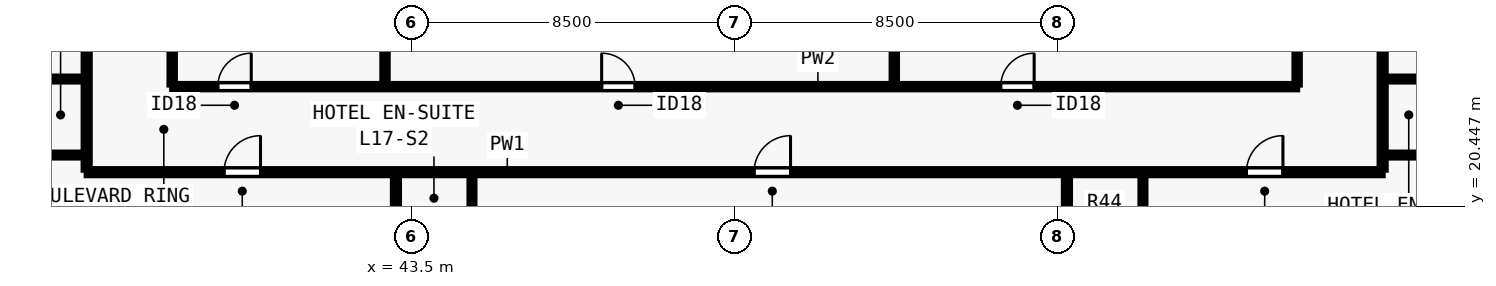
"""IFC4 building model, lengths in metres.
Left out: names, types, materials, properties, quantities, classifications, styles, units other than length and angle.
Written with IfcOpenShell. Run it as: python <this file> out.ifc"""

import sys

from ifc_helpers import new_model, si_unit, direction, frame, frame_2d, origin, place, context, subcontext, project, spatial, rectangle, extrude, element, fill, save


model = new_model("IFC4")
c1 = context("Model", 3, precision=1e-05, world=origin(), true_north=direction((0.0, 1.0)))
c2 = subcontext(c1, "Body", "Model", "MODEL_VIEW")
j1 = project(units=[si_unit("LENGTHUNIT", "METRE"), si_unit("PLANEANGLEUNIT", "RADIAN")], contexts=[c1])
p1 = place(None, origin())
s1 = spatial("IfcSite", under=j1, at=p1, CompositionType="ELEMENT")
p2 = place(p1, origin())
s2 = spatial("IfcBuilding", under=s1, at=p2, CompositionType="ELEMENT")
p3 = place(p2, frame((0.0, 0.0, 65.5)))
s3 = spatial("IfcBuildingStorey", under=s2, at=p3, CompositionType="ELEMENT", Elevation=65.5)
p4 = place(p3, frame((34.95, 21.35, 0.0), z_axis=(0.0, 0.0, 1.0), x_axis=(1.0, 0.0, 0.0)))
e1 = element("IfcWall", 1, at=p4, inside=s3, PredefinedType="PARTITIONING", context=c2, shape_type="SweptSolid", body=[
    extrude(rectangle(XDim=34.1, YDim=0.16, at=frame_2d((17.05, 0.0))), origin(), (0.0, 0.0, 1.0), 3.28),
])
p5 = place(p4, frame((3.614, 0.0, 0.0)))
e2 = element("IfcOpeningElement", 2, at=p5, cuts=e1, PredefinedType="OPENING", context=c2, shape_type="SweptSolid", body=[
    extrude(rectangle(XDim=0.96, YDim=2.15, at=frame_2d((0.48, 1.075))), frame((0.0, 0.09, 0.0), z_axis=(0.0, -1.0, 0.0), x_axis=(1.0, 0.0, 0.0)), (0.0, 0.0, 1.0), 0.18),
])
p6 = place(p4, frame((17.56, 0.0, 0.0)))
e3 = element("IfcOpeningElement", 3, at=p6, cuts=e1, PredefinedType="OPENING", context=c2, shape_type="SweptSolid", body=[
    extrude(rectangle(XDim=0.96, YDim=2.15, at=frame_2d((0.48, 1.075))), frame((0.0, 0.09, 0.0), z_axis=(0.0, -1.0, 0.0), x_axis=(1.0, 0.0, 0.0)), (0.0, 0.0, 1.0), 0.18),
])
p7 = place(p4, frame((30.516, 0.0, 0.0)))
e4 = element("IfcOpeningElement", 4, at=p7, cuts=e1, PredefinedType="OPENING", context=c2, shape_type="SweptSolid", body=[
    extrude(rectangle(XDim=0.96, YDim=2.15, at=frame_2d((0.48, 1.075))), frame((0.0, 0.09, 0.0), z_axis=(0.0, -1.0, 0.0), x_axis=(1.0, 0.0, 0.0)), (0.0, 0.0, 1.0), 0.18),
])
p8 = place(p3, frame((34.95, 21.415, 0.0), z_axis=(0.0, 0.0, 1.0), x_axis=(0.0, 1.0, 0.0)))
e5 = element("IfcWall", 5, at=p8, inside=s3, PredefinedType="PARTITIONING", context=c2, shape_type="SweptSolid", body=[
    extrude(rectangle(XDim=35.17, YDim=0.16, at=frame_2d((17.585, 0.0))), origin(), (0.0, 0.0, 1.0), 3.28),
])
p9 = place(p8, frame((9.414, 0.0, 0.0)))
e6 = element("IfcOpeningElement", 6, at=p9, cuts=e5, PredefinedType="OPENING", context=c2, shape_type="SweptSolid", body=[
    extrude(rectangle(XDim=0.96, YDim=2.15, at=frame_2d((0.48, 1.075))), frame((0.0, 0.09, 0.0), z_axis=(0.0, -1.0, 0.0), x_axis=(1.0, 0.0, 0.0)), (0.0, 0.0, 1.0), 0.18),
])
p10 = place(p8, frame((26.814, 0.0, 0.0)))
e7 = element("IfcOpeningElement", 7, at=p10, cuts=e5, PredefinedType="OPENING", context=c2, shape_type="SweptSolid", body=[
    extrude(rectangle(XDim=0.96, YDim=2.15, at=frame_2d((0.48, 1.075))), frame((0.0, 0.09, 0.0), z_axis=(0.0, -1.0, 0.0), x_axis=(1.0, 0.0, 0.0)), (0.0, 0.0, 1.0), 0.18),
])
p11 = place(p3, frame((69.05, 21.415, 0.0), z_axis=(0.0, 0.0, 1.0), x_axis=(0.0, 1.0, 0.0)))
e8 = element("IfcWall", 8, at=p11, inside=s3, PredefinedType="PARTITIONING", context=c2, shape_type="SweptSolid", body=[
    extrude(rectangle(XDim=35.17, YDim=0.16, at=frame_2d((17.585, 0.0))), origin(), (0.0, 0.0, 1.0), 3.28),
])
p12 = place(p11, frame((9.746, 0.0, 0.0)))
e9 = element("IfcOpeningElement", 9, at=p12, cuts=e8, PredefinedType="OPENING", context=c2, shape_type="SweptSolid", body=[
    extrude(rectangle(XDim=0.96, YDim=2.15, at=frame_2d((0.48, 1.075))), frame((0.0, 0.09, 0.0), z_axis=(0.0, -1.0, 0.0), x_axis=(1.0, 0.0, 0.0)), (0.0, 0.0, 1.0), 0.18),
])
p13 = place(p11, frame((27.146, 0.0, 0.0)))
e10 = element("IfcOpeningElement", 10, at=p13, cuts=e8, PredefinedType="OPENING", context=c2, shape_type="SweptSolid", body=[
    extrude(rectangle(XDim=0.96, YDim=2.15, at=frame_2d((0.48, 1.075))), frame((0.0, 0.09, 0.0), z_axis=(0.0, -1.0, 0.0), x_axis=(1.0, 0.0, 0.0)), (0.0, 0.0, 1.0), 0.18),
])
p14 = place(p3, frame((37.2, 23.6, 0.0), z_axis=(0.0, 0.0, 1.0), x_axis=(1.0, 0.0, 0.0)))
e11 = element("IfcWall", 11, at=p14, inside=s3, PredefinedType="PARTITIONING", context=c2, shape_type="SweptSolid", body=[
    extrude(rectangle(XDim=29.6, YDim=0.14, at=frame_2d((14.8, 0.0))), origin(), (0.0, 0.0, 1.0), 3.28),
])
p15 = place(p14, frame((1.2, 0.0, 0.0)))
e12 = element("IfcOpeningElement", 12, at=p15, cuts=e11, PredefinedType="OPENING", context=c2, shape_type="SweptSolid", body=[
    extrude(rectangle(XDim=0.88, YDim=2.1, at=frame_2d((0.44, 1.05))), frame((0.0, 0.08, 0.0), z_axis=(0.0, -1.0, 0.0), x_axis=(1.0, 0.0, 0.0)), (0.0, 0.0, 1.0), 0.16),
])
p16 = place(p14, frame((11.3, 0.0, 0.0)))
e13 = element("IfcOpeningElement", 13, at=p16, cuts=e11, PredefinedType="OPENING", context=c2, shape_type="SweptSolid", body=[
    extrude(rectangle(XDim=0.88, YDim=2.1, at=frame_2d((0.44, 1.05))), frame((0.0, 0.08, 0.0), z_axis=(0.0, -1.0, 0.0), x_axis=(1.0, 0.0, 0.0)), (0.0, 0.0, 1.0), 0.16),
])
p17 = place(p14, frame((21.8, 0.0, 0.0)))
e14 = element("IfcOpeningElement", 14, at=p17, cuts=e11, PredefinedType="OPENING", context=c2, shape_type="SweptSolid", body=[
    extrude(rectangle(XDim=0.88, YDim=2.1, at=frame_2d((0.44, 1.05))), frame((0.0, 0.08, 0.0), z_axis=(0.0, -1.0, 0.0), x_axis=(1.0, 0.0, 0.0)), (0.0, 0.0, 1.0), 0.16),
])
p18 = place(p3, frame((37.2, 23.655, 0.0), z_axis=(0.0, 0.0, 1.0), x_axis=(0.0, 1.0, 0.0)))
e15 = element("IfcWall", 15, at=p18, inside=s3, PredefinedType="PARTITIONING", context=c2, shape_type="SweptSolid", body=[
    extrude(rectangle(XDim=15.095, YDim=0.14, at=frame_2d((7.547, 0.0))), origin(), (0.0, 0.0, 1.0), 3.28),
])
p19 = place(p18, frame((1.045, 0.0, 0.0)))
e16 = element("IfcOpeningElement", 16, at=p19, cuts=e15, PredefinedType="OPENING", context=c2, shape_type="SweptSolid", body=[
    extrude(rectangle(XDim=0.88, YDim=2.1, at=frame_2d((0.44, 1.05))), frame((0.0, 0.08, 0.0), z_axis=(0.0, -1.0, 0.0), x_axis=(1.0, 0.0, 0.0)), (0.0, 0.0, 1.0), 0.16),
])
p20 = place(p18, frame((12.145, 0.0, 0.0)))
e17 = element("IfcOpeningElement", 17, at=p20, cuts=e15, PredefinedType="OPENING", context=c2, shape_type="SweptSolid", body=[
    extrude(rectangle(XDim=0.88, YDim=2.1, at=frame_2d((0.44, 1.05))), frame((0.0, 0.08, 0.0), z_axis=(0.0, -1.0, 0.0), x_axis=(1.0, 0.0, 0.0)), (0.0, 0.0, 1.0), 0.16),
])
p21 = place(p3, frame((66.8, 23.655, 0.0), z_axis=(0.0, 0.0, 1.0), x_axis=(0.0, 1.0, 0.0)))
e18 = element("IfcWall", 18, at=p21, inside=s3, PredefinedType="PARTITIONING", context=c2, shape_type="SweptSolid", body=[
    extrude(rectangle(XDim=15.095, YDim=0.14, at=frame_2d((7.547, 0.0))), origin(), (0.0, 0.0, 1.0), 3.28),
])
p22 = place(p21, frame((2.445, 0.0, 0.0)))
e19 = element("IfcOpeningElement", 19, at=p22, cuts=e18, PredefinedType="OPENING", context=c2, shape_type="SweptSolid", body=[
    extrude(rectangle(XDim=0.88, YDim=2.1, at=frame_2d((0.44, 1.05))), frame((0.0, 0.08, 0.0), z_axis=(0.0, -1.0, 0.0), x_axis=(1.0, 0.0, 0.0)), (0.0, 0.0, 1.0), 0.16),
])
p23 = place(p3, frame((42.8, 23.655, 0.0), z_axis=(0.0, 0.0, 1.0), x_axis=(0.0, 1.0, 0.0)))
e20 = element("IfcWall", 20, at=p23, inside=s3, PredefinedType="PARTITIONING", context=c2, shape_type="SweptSolid", body=[
    extrude(rectangle(XDim=6.845, YDim=0.14, at=frame_2d((3.422, 0.0))), origin(), (0.0, 0.0, 1.0), 2.439),
])
p24 = place(p3, frame((56.2, 23.655, 0.0), z_axis=(0.0, 0.0, 1.0), x_axis=(0.0, 1.0, 0.0)))
e21 = element("IfcWall", 21, at=p24, inside=s3, PredefinedType="PARTITIONING", context=c2, shape_type="SweptSolid", body=[
    extrude(rectangle(XDim=6.585, YDim=0.14, at=frame_2d((3.292, 0.0))), origin(), (0.0, 0.0, 1.0), 2.849),
])
p25 = place(p3, frame((43.087, 13.845, 0.0), z_axis=(0.0, 0.0, 1.0), x_axis=(0.0, 1.0, 0.0)))
e22 = element("IfcWall", 22, at=p25, inside=s3, PredefinedType="PARTITIONING", context=c2, shape_type="SweptSolid", body=[
    extrude(rectangle(XDim=7.44, YDim=0.16, at=frame_2d((3.72, 0.0))), origin(), (0.0, 0.0, 1.0), 3.28),
])
p26 = place(p3, frame((45.087, 19.05, 0.0), z_axis=(0.0, 0.0, 1.0), x_axis=(0.0, 1.0, 0.0)))
e23 = element("IfcWall", 23, at=p26, inside=s3, PredefinedType="PLUMBINGWALL", context=c2, shape_type="SweptSolid", body=[
    extrude(rectangle(XDim=2.235, YDim=0.13, at=frame_2d((1.117, 0.0))), origin(), (0.0, 0.0, 1.0), 3.28),
])
p27 = place(p3, frame((60.742, 13.845, 0.0), z_axis=(0.0, 0.0, 1.0), x_axis=(0.0, 1.0, 0.0)))
e24 = element("IfcWall", 24, at=p27, inside=s3, PredefinedType="PARTITIONING", context=c2, shape_type="SweptSolid", body=[
    extrude(rectangle(XDim=7.44, YDim=0.16, at=frame_2d((3.72, 0.0))), origin(), (0.0, 0.0, 1.0), 3.28),
])
p28 = place(p3, frame((62.742, 19.05, 0.0), z_axis=(0.0, 0.0, 1.0), x_axis=(0.0, 1.0, 0.0)))
e25 = element("IfcWall", 25, at=p28, inside=s3, PredefinedType="PLUMBINGWALL", context=c2, shape_type="SweptSolid", body=[
    extrude(rectangle(XDim=2.235, YDim=0.13, at=frame_2d((1.117, 0.0))), origin(), (0.0, 0.0, 1.0), 3.28),
])
p29 = place(p3, frame((32.65, 21.8, 0.0), z_axis=(0.0, 0.0, 1.0), x_axis=(1.0, 0.0, 0.0)))
e26 = element("IfcWall", 26, at=p29, inside=s3, PredefinedType="PLUMBINGWALL", context=c2, shape_type="SweptSolid", body=[
    extrude(rectangle(XDim=2.235, YDim=0.13, at=frame_2d((1.118, 0.0))), origin(), (0.0, 0.0, 1.0), 2.849),
])
p30 = place(p3, frame((32.65, 23.8, 0.0), z_axis=(0.0, 0.0, 1.0), x_axis=(1.0, 0.0, 0.0)))
e27 = element("IfcWall", 27, at=p30, inside=s3, PredefinedType="PLUMBINGWALL", context=c2, shape_type="SweptSolid", body=[
    extrude(rectangle(XDim=2.235, YDim=0.13, at=frame_2d((1.118, 0.0))), origin(), (0.0, 0.0, 1.0), 3.28),
])
p31 = place(p3, frame((69.115, 21.8, 0.0), z_axis=(0.0, 0.0, 1.0), x_axis=(1.0, 0.0, 0.0)))
e28 = element("IfcWall", 28, at=p31, inside=s3, PredefinedType="PLUMBINGWALL", context=c2, shape_type="SweptSolid", body=[
    extrude(rectangle(XDim=2.235, YDim=0.13, at=frame_2d((1.118, 0.0))), origin(), (0.0, 0.0, 1.0), 2.849),
])
p32 = place(p3, frame((69.115, 23.8, 0.0), z_axis=(0.0, 0.0, 1.0), x_axis=(1.0, 0.0, 0.0)))
e29 = element("IfcWall", 29, at=p32, inside=s3, PredefinedType="PLUMBINGWALL", context=c2, shape_type="SweptSolid", body=[
    extrude(rectangle(XDim=2.235, YDim=0.13, at=frame_2d((1.118, 0.0))), origin(), (0.0, 0.0, 1.0), 3.28),
])
p33 = place(p15, origin())
e30 = element("IfcDoor", 30, at=p33, inside=s3, OperationType="SINGLE_SWING_RIGHT", PredefinedType="DOOR", context=c2, shape_type="SweptSolid", body=[
    extrude(rectangle(XDim=0.88, YDim=2.1, at=frame_2d((0.44, 1.05))), frame((0.0, 0.025, 0.0), z_axis=(0.0, -1.0, 0.0), x_axis=(1.0, 0.0, 0.0)), (0.0, 0.0, 1.0), 0.05),
])
fill(e12, e30)
p34 = place(p16, origin())
e31 = element("IfcDoor", 31, at=p34, inside=s3, OperationType="SINGLE_SWING_LEFT", PredefinedType="DOOR", context=c2, shape_type="SweptSolid", body=[
    extrude(rectangle(XDim=0.88, YDim=2.1, at=frame_2d((0.44, 1.05))), frame((0.0, 0.025, 0.0), z_axis=(0.0, -1.0, 0.0), x_axis=(1.0, 0.0, 0.0)), (0.0, 0.0, 1.0), 0.05),
])
fill(e13, e31)
p35 = place(p17, origin())
e32 = element("IfcDoor", 32, at=p35, inside=s3, OperationType="SINGLE_SWING_RIGHT", PredefinedType="DOOR", context=c2, shape_type="SweptSolid", body=[
    extrude(rectangle(XDim=0.88, YDim=2.1, at=frame_2d((0.44, 1.05))), frame((0.0, 0.025, 0.0), z_axis=(0.0, -1.0, 0.0), x_axis=(1.0, 0.0, 0.0)), (0.0, 0.0, 1.0), 0.05),
])
fill(e14, e32)
p36 = place(p5, origin())
e33 = element("IfcDoor", 33, at=p36, inside=s3, OperationType="SINGLE_SWING_RIGHT", PredefinedType="DOOR", context=c2, shape_type="SweptSolid", body=[
    extrude(rectangle(XDim=0.96, YDim=2.15, at=frame_2d((0.48, 1.075))), frame((0.0, 0.025, 0.0), z_axis=(0.0, -1.0, 0.0), x_axis=(1.0, 0.0, 0.0)), (0.0, 0.0, 1.0), 0.05),
])
fill(e2, e33)
p37 = place(p6, origin())
e34 = element("IfcDoor", 34, at=p37, inside=s3, OperationType="SINGLE_SWING_RIGHT", PredefinedType="DOOR", context=c2, shape_type="SweptSolid", body=[
    extrude(rectangle(XDim=0.96, YDim=2.15, at=frame_2d((0.48, 1.075))), frame((0.0, 0.025, 0.0), z_axis=(0.0, -1.0, 0.0), x_axis=(1.0, 0.0, 0.0)), (0.0, 0.0, 1.0), 0.05),
])
fill(e3, e34)
p38 = place(p7, origin())
e35 = element("IfcDoor", 35, at=p38, inside=s3, OperationType="SINGLE_SWING_RIGHT", PredefinedType="DOOR", context=c2, shape_type="SweptSolid", body=[
    extrude(rectangle(XDim=0.96, YDim=2.15, at=frame_2d((0.48, 1.075))), frame((0.0, 0.025, 0.0), z_axis=(0.0, -1.0, 0.0), x_axis=(1.0, 0.0, 0.0)), (0.0, 0.0, 1.0), 0.05),
])
fill(e4, e35)
save(model, sys.argv[1])
